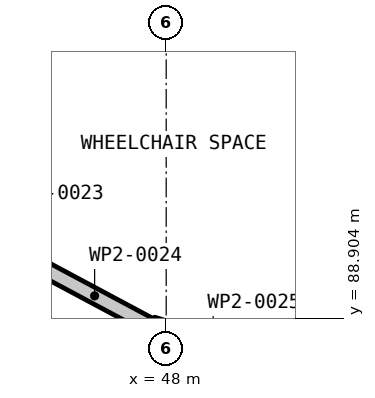
"""IFC4 building model, lengths in metres.
Left out: names, types, materials, properties, quantities, classifications, styles, units other than length and angle.
Written with IfcOpenShell. Run it as: python <this file> out.ifc"""

import sys

from ifc_helpers import new_model, si_unit, direction, frame, frame_2d, origin, place, context, subcontext, project, spatial, rectangle, extrude, element, save


model = new_model("IFC4")
c1 = context("Model", 3, precision=1e-05, world=origin(), true_north=direction((0.0, 1.0)))
c2 = subcontext(c1, "Body", "Model", "MODEL_VIEW")
j1 = project(units=[si_unit("LENGTHUNIT", "METRE"), si_unit("PLANEANGLEUNIT", "RADIAN")], contexts=[c1])
p1 = place(None, origin())
s1 = spatial("IfcSite", under=j1, at=p1, CompositionType="ELEMENT")
p2 = place(p1, origin())
s2 = spatial("IfcBuilding", under=s1, at=p2, CompositionType="ELEMENT")
p3 = place(p2, frame((0.0, 0.0, 6.0)))
s3 = spatial("IfcBuildingStorey", under=s2, at=p3, CompositionType="ELEMENT", Elevation=6.0)
p4 = place(p3, frame((47.796, 88.805, 0.0), z_axis=(0.0, 0.0, 1.0), x_axis=(-0.881863670633, 0.471504471259, 0.0)))
e1 = element("IfcWall", 1, at=p4, inside=s3, PredefinedType="PARTITIONING", context=c2, shape_type="SweptSolid", body=[
    extrude(rectangle(XDim=1.673, YDim=0.2, at=frame_2d((0.836, 0.0))), origin(), (0.0, 0.0, 1.0), 4.95),
])
p5 = place(p3, frame((49.418, 88.338, 0.0), z_axis=(0.0, 0.0, 1.0), x_axis=(-0.956929827872, 0.290319314771, 0.0)))
e2 = element("IfcWall", 2, at=p5, inside=s3, PredefinedType="PARTITIONING", context=c2, shape_type="SweptSolid", body=[
    extrude(rectangle(XDim=1.673, YDim=0.2, at=frame_2d((0.836, 0.0))), origin(), (0.0, 0.0, 1.0), 4.95),
])
save(model, sys.argv[1])
